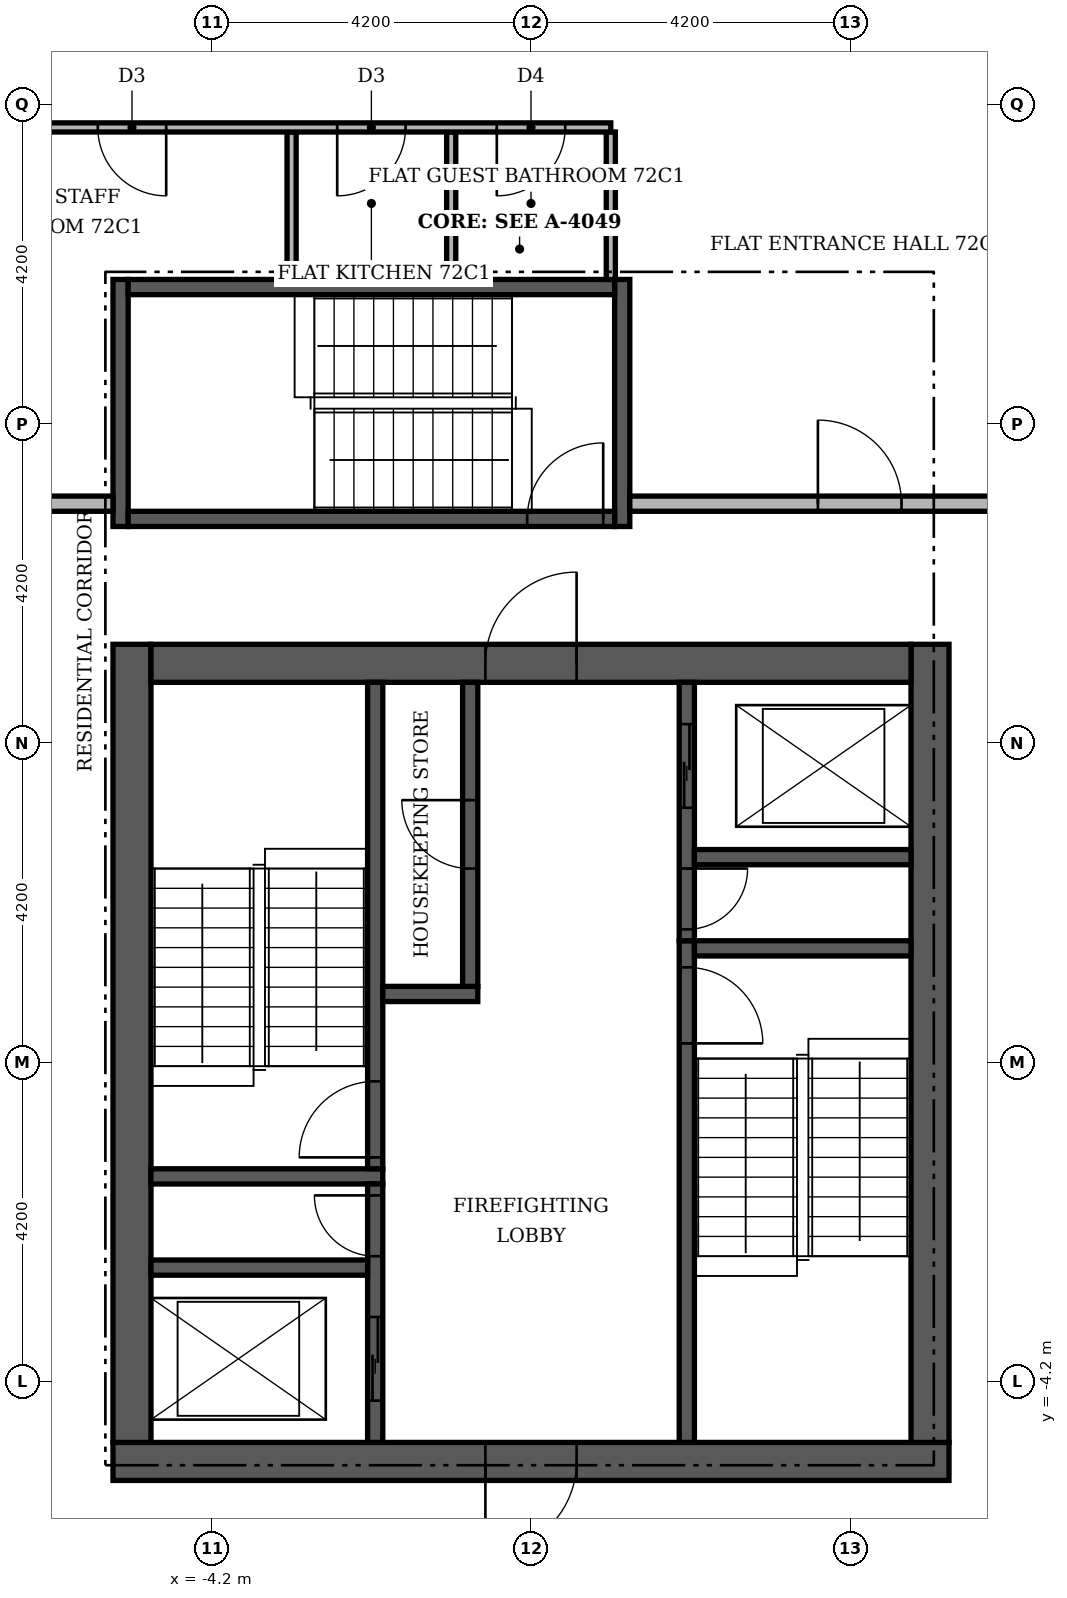
"""IFC4 building model, lengths in metres.
Left out: names, types, materials, properties, quantities, classifications, styles, units other than length and angle.
Written with IfcOpenShell. Run it as: python <this file> out.ifc"""

import sys

from ifc_helpers import new_model, si_unit, direction, frame, frame_2d, origin, place, context, subcontext, project, spatial, rectangle, extrude, element, fill, save


model = new_model("IFC4")
c1 = context("Model", 3, precision=1e-05, world=origin(), true_north=direction((0.0, 1.0)))
c2 = subcontext(c1, "Body", "Model", "MODEL_VIEW")
j1 = project(units=[si_unit("LENGTHUNIT", "METRE"), si_unit("PLANEANGLEUNIT", "RADIAN")], contexts=[c1])
p1 = place(None, origin())
s1 = spatial("IfcSite", under=j1, at=p1, CompositionType="ELEMENT")
p2 = place(p1, origin())
s2 = spatial("IfcBuilding", under=s1, at=p2, CompositionType="ELEMENT")
p3 = place(p2, frame((0.0, 0.0, 300.6)))
s3 = spatial("IfcBuildingStorey", under=s2, at=p3, CompositionType="ELEMENT", Elevation=300.6)
p4 = place(p3, frame((-5.5, -5.25, 0.0), z_axis=(0.0, 0.0, 1.0), x_axis=(1.0, 0.0, 0.0)))
e1 = element("IfcWall", 1, at=p4, inside=s3, PredefinedType="SHEAR", context=c2, shape_type="SweptSolid", body=[
    extrude(rectangle(XDim=11.0, YDim=0.5, at=frame_2d((5.5, 0.0))), origin(), (0.0, 0.0, 1.0), 3.55),
])
p5 = place(p4, frame((4.9, 0.0, 0.0)))
e2 = element("IfcOpeningElement", 2, at=p5, cuts=e1, PredefinedType="OPENING", context=c2, shape_type="SweptSolid", body=[
    extrude(rectangle(XDim=1.2, YDim=2.1, at=frame_2d((0.6, 1.05))), frame((0.0, 0.26, 0.0), z_axis=(0.0, -1.0, 0.0), x_axis=(1.0, 0.0, 0.0)), (0.0, 0.0, 1.0), 0.52),
])
for number, where, z_axis, x_axis in (
    (3, (-5.25, -5.0, 0.0), (0.0, 0.0, 1.0), (0.0, 1.0, 0.0)),
    (4, (5.25, -5.0, 0.0), (0.0, 0.0, 1.0), (0.0, 1.0, 0.0)),
):
    element("IfcWall", number, at=place(p3, frame(where, z_axis=z_axis, x_axis=x_axis)), inside=s3, PredefinedType="SHEAR", context=c2, shape_type="SweptSolid", body=[
        extrude(rectangle(XDim=10.5, YDim=0.5, at=frame_2d((5.25, 0.0))), origin(), (0.0, 0.0, 1.0), 3.55),
    ])
p6 = place(p3, frame((-5.0, 5.25, 0.0), z_axis=(0.0, 0.0, 1.0), x_axis=(1.0, 0.0, 0.0)))
e5 = element("IfcWall", 5, at=p6, inside=s3, PredefinedType="SHEAR", context=c2, shape_type="SweptSolid", body=[
    extrude(rectangle(XDim=10.0, YDim=0.5, at=frame_2d((5.0, 0.0))), origin(), (0.0, 0.0, 1.0), 3.55),
])
p7 = place(p6, frame((4.4, 0.0, 0.0)))
e6 = element("IfcOpeningElement", 6, at=p7, cuts=e5, PredefinedType="OPENING", context=c2, shape_type="SweptSolid", body=[
    extrude(rectangle(XDim=1.2, YDim=2.1, at=frame_2d((0.6, 1.05))), frame((0.0, 0.26, 0.0), z_axis=(0.0, -1.0, 0.0), x_axis=(1.0, 0.0, 0.0)), (0.0, 0.0, 1.0), 0.52),
])
p8 = place(p3, frame((2.05, -5.0, 0.0), z_axis=(0.0, 0.0, 1.0), x_axis=(0.0, 1.0, 0.0)))
e7 = element("IfcWall", 7, at=p8, inside=s3, PredefinedType="SHEAR", context=c2, shape_type="SweptSolid", body=[
    extrude(rectangle(XDim=6.6, YDim=0.2, at=frame_2d((3.3, 0.0))), origin(), (0.0, 0.0, 1.0), 3.55),
])
p9 = place(p8, frame((5.25, 0.0, 0.0)))
e8 = element("IfcOpeningElement", 8, at=p9, cuts=e7, PredefinedType="OPENING", context=c2, shape_type="SweptSolid", body=[
    extrude(rectangle(XDim=1.0, YDim=2.1, at=frame_2d((0.5, 1.05))), frame((0.0, 0.11, 0.0), z_axis=(0.0, -1.0, 0.0), x_axis=(1.0, 0.0, 0.0)), (0.0, 0.0, 1.0), 0.22),
])
p10 = place(p3, frame((-5.0, -1.5, 0.0), z_axis=(0.0, 0.0, 1.0), x_axis=(1.0, 0.0, 0.0)))
e9 = element("IfcWall", 9, at=p10, inside=s3, PredefinedType="SHEAR", context=c2, shape_type="SweptSolid", body=[
    extrude(rectangle(XDim=3.05, YDim=0.2, at=frame_2d((1.525, 0.0))), origin(), (0.0, 0.0, 1.0), 3.55),
])
p11 = place(p3, frame((-2.05, -1.4, 0.0), z_axis=(0.0, 0.0, 1.0), x_axis=(0.0, 1.0, 0.0)))
e10 = element("IfcWall", 10, at=p11, inside=s3, PredefinedType="SHEAR", context=c2, shape_type="SweptSolid", body=[
    extrude(rectangle(XDim=6.4, YDim=0.2, at=frame_2d((3.2, 0.0))), origin(), (0.0, 0.0, 1.0), 3.55),
])
p12 = place(p11, frame((0.15, 0.0, 0.0)))
e11 = element("IfcOpeningElement", 11, at=p12, cuts=e10, PredefinedType="OPENING", context=c2, shape_type="SweptSolid", body=[
    extrude(rectangle(XDim=1.0, YDim=2.1, at=frame_2d((0.5, 1.05))), frame((0.0, 0.11, 0.0), z_axis=(0.0, -1.0, 0.0), x_axis=(1.0, 0.0, 0.0)), (0.0, 0.0, 1.0), 0.22),
])
p13 = place(p3, frame((2.15, 1.5, 0.0), z_axis=(0.0, 0.0, 1.0), x_axis=(1.0, 0.0, 0.0)))
e12 = element("IfcWall", 12, at=p13, inside=s3, PredefinedType="SHEAR", context=c2, shape_type="SweptSolid", body=[
    extrude(rectangle(XDim=2.85, YDim=0.2, at=frame_2d((1.425, 0.0))), origin(), (0.0, 0.0, 1.0), 3.55),
])
p14 = place(p3, frame((-2.05, -5.0, 0.0), z_axis=(0.0, 0.0, 1.0), x_axis=(0.0, 1.0, 0.0)))
e13 = element("IfcWall", 13, at=p14, inside=s3, PredefinedType="SHEAR", context=c2, shape_type="SweptSolid", body=[
    extrude(rectangle(XDim=3.4, YDim=0.2, at=frame_2d((1.7, 0.0))), origin(), (0.0, 0.0, 1.0), 3.55),
])
p15 = place(p14, frame((0.55, 0.0, 0.0)))
e14 = element("IfcOpeningElement", 14, at=p15, cuts=e13, PredefinedType="OPENING", context=c2, shape_type="SweptSolid", body=[
    extrude(rectangle(XDim=1.1, YDim=2.1, at=frame_2d((0.55, 1.05))), frame((0.0, 0.11, 0.0), z_axis=(0.0, -1.0, 0.0), x_axis=(1.0, 0.0, 0.0)), (0.0, 0.0, 1.0), 0.22),
])
p16 = place(p14, frame((2.45, 0.0, 0.0)))
e15 = element("IfcOpeningElement", 15, at=p16, cuts=e13, PredefinedType="OPENING", context=c2, shape_type="SweptSolid", body=[
    extrude(rectangle(XDim=0.8, YDim=2.1, at=frame_2d((0.4, 1.05))), frame((0.0, 0.11, 0.0), z_axis=(0.0, -1.0, 0.0), x_axis=(1.0, 0.0, 0.0)), (0.0, 0.0, 1.0), 0.22),
])
p17 = place(p3, frame((-5.0, -2.7, 0.0), z_axis=(0.0, 0.0, 1.0), x_axis=(1.0, 0.0, 0.0)))
e16 = element("IfcWall", 16, at=p17, inside=s3, PredefinedType="SHEAR", context=c2, shape_type="SweptSolid", body=[
    extrude(rectangle(XDim=2.85, YDim=0.2, at=frame_2d((1.425, 0.0))), origin(), (0.0, 0.0, 1.0), 3.55),
])
p18 = place(p3, frame((-1.95, 0.9, 0.0), z_axis=(0.0, 0.0, 1.0), x_axis=(1.0, 0.0, 0.0)))
e17 = element("IfcWall", 17, at=p18, inside=s3, PredefinedType="SHEAR", context=c2, shape_type="SweptSolid", body=[
    extrude(rectangle(XDim=1.25, YDim=0.2, at=frame_2d((0.625, 0.0))), origin(), (0.0, 0.0, 1.0), 3.55),
])
p19 = place(p3, frame((-0.8, 1.0, 0.0), z_axis=(0.0, 0.0, 1.0), x_axis=(0.0, 1.0, 0.0)))
e18 = element("IfcWall", 18, at=p19, inside=s3, PredefinedType="SHEAR", context=c2, shape_type="SweptSolid", body=[
    extrude(rectangle(XDim=4.0, YDim=0.2, at=frame_2d((2.0, 0.0))), origin(), (0.0, 0.0, 1.0), 3.55),
])
p20 = place(p19, frame((1.55, 0.0, 0.0)))
e19 = element("IfcOpeningElement", 19, at=p20, cuts=e18, PredefinedType="OPENING", context=c2, shape_type="SweptSolid", body=[
    extrude(rectangle(XDim=0.9, YDim=2.1, at=frame_2d((0.45, 1.05))), frame((0.0, 0.11, 0.0), z_axis=(0.0, -1.0, 0.0), x_axis=(1.0, 0.0, 0.0)), (0.0, 0.0, 1.0), 0.22),
])
p21 = place(p3, frame((2.05, 1.6, 0.0), z_axis=(0.0, 0.0, 1.0), x_axis=(0.0, 1.0, 0.0)))
e20 = element("IfcWall", 20, at=p21, inside=s3, PredefinedType="SHEAR", context=c2, shape_type="SweptSolid", body=[
    extrude(rectangle(XDim=3.4, YDim=0.2, at=frame_2d((1.7, 0.0))), origin(), (0.0, 0.0, 1.0), 3.55),
])
p22 = place(p21, frame((1.75, 0.0, 0.0)))
e21 = element("IfcOpeningElement", 21, at=p22, cuts=e20, PredefinedType="OPENING", context=c2, shape_type="SweptSolid", body=[
    extrude(rectangle(XDim=1.1, YDim=2.1, at=frame_2d((0.55, 1.05))), frame((0.0, 0.11, 0.0), z_axis=(0.0, -1.0, 0.0), x_axis=(1.0, 0.0, 0.0)), (0.0, 0.0, 1.0), 0.22),
])
p23 = place(p21, frame((0.15, 0.0, 0.0)))
e22 = element("IfcOpeningElement", 22, at=p23, cuts=e20, PredefinedType="OPENING", context=c2, shape_type="SweptSolid", body=[
    extrude(rectangle(XDim=0.8, YDim=2.1, at=frame_2d((0.4, 1.05))), frame((0.0, 0.11, 0.0), z_axis=(0.0, -1.0, 0.0), x_axis=(1.0, 0.0, 0.0)), (0.0, 0.0, 1.0), 0.22),
])
p24 = place(p3, frame((2.15, 2.7, 0.0), z_axis=(0.0, 0.0, 1.0), x_axis=(1.0, 0.0, 0.0)))
e23 = element("IfcWall", 23, at=p24, inside=s3, PredefinedType="SHEAR", context=c2, shape_type="SweptSolid", body=[
    extrude(rectangle(XDim=2.85, YDim=0.2, at=frame_2d((1.425, 0.0))), origin(), (0.0, 0.0, 1.0), 3.55),
])
for number, where, z_axis, x_axis in (
    (24, (-5.4, 7.05, 0.0), (0.0, 0.0, 1.0), (0.0, 1.0, 0.0)),
    (25, (1.2, 7.05, 0.0), (0.0, 0.0, 1.0), (0.0, 1.0, 0.0)),
):
    element("IfcWall", number, at=place(p3, frame(where, z_axis=z_axis, x_axis=x_axis)), inside=s3, PredefinedType="SHEAR", context=c2, shape_type="SweptSolid", body=[
        extrude(rectangle(XDim=3.25, YDim=0.2, at=frame_2d((1.625, 0.0))), origin(), (0.0, 0.0, 1.0), 3.55),
    ])
p25 = place(p3, frame((-5.3, 7.15, 0.0), z_axis=(0.0, 0.0, 1.0), x_axis=(1.0, 0.0, 0.0)))
e26 = element("IfcWall", 26, at=p25, inside=s3, PredefinedType="SHEAR", context=c2, shape_type="SweptSolid", body=[
    extrude(rectangle(XDim=6.4, YDim=0.2, at=frame_2d((3.2, 0.0))), origin(), (0.0, 0.0, 1.0), 3.55),
])
p26 = place(p25, frame((5.25, 0.0, 0.0)))
e27 = element("IfcOpeningElement", 27, at=p26, cuts=e26, PredefinedType="OPENING", context=c2, shape_type="SweptSolid", body=[
    extrude(rectangle(XDim=1.0, YDim=2.1, at=frame_2d((0.5, 1.05))), frame((0.0, 0.11, 0.0), z_axis=(0.0, -1.0, 0.0), x_axis=(1.0, 0.0, 0.0)), (0.0, 0.0, 1.0), 0.22),
])
p27 = place(p3, frame((-5.3, 10.2, 0.0), z_axis=(0.0, 0.0, 1.0), x_axis=(1.0, 0.0, 0.0)))
e28 = element("IfcWall", 28, at=p27, inside=s3, PredefinedType="SHEAR", context=c2, shape_type="SweptSolid", body=[
    extrude(rectangle(XDim=6.4, YDim=0.2, at=frame_2d((3.2, 0.0))), origin(), (0.0, 0.0, 1.0), 3.55),
])
p28 = place(p3, frame((-7.35, 7.35, 0.0), z_axis=(0.0, 0.0, 1.0), x_axis=(1.0, 0.0, 0.0)))
e29 = element("IfcWall", 29, at=p28, inside=s3, PredefinedType="PARTITIONING", context=c2, shape_type="SweptSolid", body=[
    extrude(rectangle(XDim=1.85, YDim=0.2, at=frame_2d((0.925, 0.0))), origin(), (0.0, 0.0, 1.0), 3.55),
])
p29 = place(p3, frame((1.3, 7.35, 0.0), z_axis=(0.0, 0.0, 1.0), x_axis=(1.0, 0.0, 0.0)))
e30 = element("IfcWall", 30, at=p29, inside=s3, PredefinedType="PARTITIONING", context=c2, shape_type="SweptSolid", body=[
    extrude(rectangle(XDim=17.2, YDim=0.2, at=frame_2d((8.6, 0.0))), origin(), (0.0, 0.0, 1.0), 3.55),
])
p30 = place(p29, frame((2.475, 0.0, 0.0)))
e31 = element("IfcOpeningElement", 31, at=p30, cuts=e30, PredefinedType="OPENING", context=c2, shape_type="SweptSolid", body=[
    extrude(rectangle(XDim=1.1, YDim=2.4, at=frame_2d((0.55, 1.2))), frame((0.0, 0.11, 0.0), z_axis=(0.0, -1.0, 0.0), x_axis=(1.0, 0.0, 0.0)), (0.0, 0.0, 1.0), 0.22),
])
for number, where, z_axis, x_axis in (
    (32, (-3.15, 10.3, 0.0), (0.0, 0.0, 1.0), (0.0, 1.0, 0.0)),
    (33, (-1.05, 10.3, 0.0), (0.0, 0.0, 1.0), (0.0, 1.0, 0.0)),
    (34, (1.05, 10.3, 0.0), (0.0, 0.0, 1.0), (0.0, 1.0, 0.0)),
):
    element("IfcWall", number, at=place(p3, frame(where, z_axis=z_axis, x_axis=x_axis)), inside=s3, PredefinedType="PARTITIONING", context=c2, shape_type="SweptSolid", body=[
        extrude(rectangle(XDim=1.94, YDim=0.12, at=frame_2d((0.97, 0.0))), origin(), (0.0, 0.0, 1.0), 3.55),
    ])
p31 = place(p3, frame((-7.25, 12.3, 0.0), z_axis=(0.0, 0.0, 1.0), x_axis=(1.0, 0.0, 0.0)))
e35 = element("IfcWall", 35, at=p31, inside=s3, PredefinedType="PARTITIONING", context=c2, shape_type="SweptSolid", body=[
    extrude(rectangle(XDim=8.3, YDim=0.12, at=frame_2d((4.15, 0.0))), origin(), (0.0, 0.0, 1.0), 3.55),
])
p32 = place(p31, frame((6.8, 0.0, 0.0)))
e36 = element("IfcOpeningElement", 36, at=p32, cuts=e35, PredefinedType="OPENING", context=c2, shape_type="SweptSolid", body=[
    extrude(rectangle(XDim=0.9, YDim=2.1, at=frame_2d((0.45, 1.05))), frame((0.0, 0.07, 0.0), z_axis=(0.0, -1.0, 0.0), x_axis=(1.0, 0.0, 0.0)), (0.0, 0.0, 1.0), 0.14),
])
p33 = place(p31, frame((4.7, 0.0, 0.0)))
e37 = element("IfcOpeningElement", 37, at=p33, cuts=e35, PredefinedType="OPENING", context=c2, shape_type="SweptSolid", body=[
    extrude(rectangle(XDim=0.9, YDim=2.1, at=frame_2d((0.45, 1.05))), frame((0.0, 0.07, 0.0), z_axis=(0.0, -1.0, 0.0), x_axis=(1.0, 0.0, 0.0)), (0.0, 0.0, 1.0), 0.14),
])
p34 = place(p31, frame((1.55, 0.0, 0.0)))
e38 = element("IfcOpeningElement", 38, at=p34, cuts=e35, PredefinedType="OPENING", context=c2, shape_type="SweptSolid", body=[
    extrude(rectangle(XDim=0.9, YDim=2.1, at=frame_2d((0.45, 1.05))), frame((0.0, 0.07, 0.0), z_axis=(0.0, -1.0, 0.0), x_axis=(1.0, 0.0, 0.0)), (0.0, 0.0, 1.0), 0.14),
])
p35 = place(p22, origin())
e39 = element("IfcDoor", 39, at=p35, inside=s3, OperationType="SLIDING_TO_LEFT", PredefinedType="DOOR", context=c2, shape_type="SweptSolid", body=[
    extrude(rectangle(XDim=1.1, YDim=2.1, at=frame_2d((0.55, 1.05))), frame((0.0, 0.025, 0.0), z_axis=(0.0, -1.0, 0.0), x_axis=(1.0, 0.0, 0.0)), (0.0, 0.0, 1.0), 0.05),
])
fill(e21, e39)
p36 = place(p15, origin())
e40 = element("IfcDoor", 40, at=p36, inside=s3, OperationType="SLIDING_TO_LEFT", PredefinedType="DOOR", context=c2, shape_type="SweptSolid", body=[
    extrude(rectangle(XDim=1.1, YDim=2.1, at=frame_2d((0.55, 1.05))), frame((0.0, 0.025, 0.0), z_axis=(0.0, -1.0, 0.0), x_axis=(1.0, 0.0, 0.0)), (0.0, 0.0, 1.0), 0.05),
])
fill(e14, e40)
p37 = place(p12, origin())
e41 = element("IfcDoor", 41, at=p37, inside=s3, OperationType="SINGLE_SWING_LEFT", PredefinedType="DOOR", context=c2, shape_type="SweptSolid", body=[
    extrude(rectangle(XDim=1.0, YDim=2.1, at=frame_2d((0.5, 1.05))), frame((0.0, 0.025, 0.0), z_axis=(0.0, -1.0, 0.0), x_axis=(1.0, 0.0, 0.0)), (0.0, 0.0, 1.0), 0.05),
])
fill(e11, e41)
p38 = place(p9, frame((1.0, 0.0, 0.0), z_axis=(0.0, 0.0, 1.0), x_axis=(-1.0, 0.0, 0.0)))
e42 = element("IfcDoor", 42, at=p38, inside=s3, OperationType="SINGLE_SWING_LEFT", PredefinedType="DOOR", context=c2, shape_type="SweptSolid", body=[
    extrude(rectangle(XDim=1.0, YDim=2.1, at=frame_2d((0.5, 1.05))), frame((0.0, 0.025, 0.0), z_axis=(0.0, -1.0, 0.0), x_axis=(1.0, 0.0, 0.0)), (0.0, 0.0, 1.0), 0.05),
])
fill(e8, e42)
p39 = place(p23, frame((0.8, 0.0, 0.0), z_axis=(0.0, 0.0, 1.0), x_axis=(-1.0, 0.0, 0.0)))
e43 = element("IfcDoor", 43, at=p39, inside=s3, OperationType="SINGLE_SWING_RIGHT", PredefinedType="DOOR", context=c2, shape_type="SweptSolid", body=[
    extrude(rectangle(XDim=0.8, YDim=2.1, at=frame_2d((0.4, 1.05))), frame((0.0, 0.025, 0.0), z_axis=(0.0, -1.0, 0.0), x_axis=(1.0, 0.0, 0.0)), (0.0, 0.0, 1.0), 0.05),
])
fill(e22, e43)
p40 = place(p16, origin())
e44 = element("IfcDoor", 44, at=p40, inside=s3, OperationType="SINGLE_SWING_RIGHT", PredefinedType="DOOR", context=c2, shape_type="SweptSolid", body=[
    extrude(rectangle(XDim=0.8, YDim=2.1, at=frame_2d((0.4, 1.05))), frame((0.0, 0.025, 0.0), z_axis=(0.0, -1.0, 0.0), x_axis=(1.0, 0.0, 0.0)), (0.0, 0.0, 1.0), 0.05),
])
fill(e15, e44)
p41 = place(p26, origin())
e45 = element("IfcDoor", 45, at=p41, inside=s3, OperationType="SINGLE_SWING_RIGHT", PredefinedType="DOOR", context=c2, shape_type="SweptSolid", body=[
    extrude(rectangle(XDim=1.0, YDim=2.1, at=frame_2d((0.5, 1.05))), frame((0.0, 0.025, 0.0), z_axis=(0.0, -1.0, 0.0), x_axis=(1.0, 0.0, 0.0)), (0.0, 0.0, 1.0), 0.05),
])
fill(e27, e45)
p42 = place(p20, origin())
e46 = element("IfcDoor", 46, at=p42, inside=s3, OperationType="SINGLE_SWING_RIGHT", PredefinedType="DOOR", context=c2, shape_type="SweptSolid", body=[
    extrude(rectangle(XDim=0.9, YDim=2.1, at=frame_2d((0.45, 1.05))), frame((0.0, 0.025, 0.0), z_axis=(0.0, -1.0, 0.0), x_axis=(1.0, 0.0, 0.0)), (0.0, 0.0, 1.0), 0.05),
])
fill(e19, e46)
p43 = place(p7, origin())
e47 = element("IfcDoor", 47, at=p43, inside=s3, OperationType="SINGLE_SWING_RIGHT", PredefinedType="DOOR", context=c2, shape_type="SweptSolid", body=[
    extrude(rectangle(XDim=1.2, YDim=2.1, at=frame_2d((0.6, 1.05))), frame((0.0, 0.025, 0.0), z_axis=(0.0, -1.0, 0.0), x_axis=(1.0, 0.0, 0.0)), (0.0, 0.0, 1.0), 0.05),
])
fill(e6, e47)
p44 = place(p5, frame((1.2, 0.0, 0.0), z_axis=(0.0, 0.0, 1.0), x_axis=(-1.0, 0.0, 0.0)))
e48 = element("IfcDoor", 48, at=p44, inside=s3, OperationType="SINGLE_SWING_LEFT", PredefinedType="DOOR", context=c2, shape_type="SweptSolid", body=[
    extrude(rectangle(XDim=1.2, YDim=2.1, at=frame_2d((0.6, 1.05))), frame((0.0, 0.025, 0.0), z_axis=(0.0, -1.0, 0.0), x_axis=(1.0, 0.0, 0.0)), (0.0, 0.0, 1.0), 0.05),
])
fill(e2, e48)
p45 = place(p30, origin())
e49 = element("IfcDoor", 49, at=p45, inside=s3, OperationType="SINGLE_SWING_LEFT", PredefinedType="DOOR", context=c2, shape_type="SweptSolid", body=[
    extrude(rectangle(XDim=1.1, YDim=2.4, at=frame_2d((0.55, 1.2))), frame((0.0, 0.025, 0.0), z_axis=(0.0, -1.0, 0.0), x_axis=(1.0, 0.0, 0.0)), (0.0, 0.0, 1.0), 0.05),
])
fill(e31, e49)
p46 = place(p32, frame((0.9, 0.0, 0.0), z_axis=(0.0, 0.0, 1.0), x_axis=(-1.0, 0.0, 0.0)))
e50 = element("IfcDoor", 50, at=p46, inside=s3, OperationType="SINGLE_SWING_LEFT", PredefinedType="DOOR", context=c2, shape_type="SweptSolid", body=[
    extrude(rectangle(XDim=0.9, YDim=2.1, at=frame_2d((0.45, 1.05))), frame((0.0, 0.025, 0.0), z_axis=(0.0, -1.0, 0.0), x_axis=(1.0, 0.0, 0.0)), (0.0, 0.0, 1.0), 0.05),
])
fill(e36, e50)
p47 = place(p33, frame((0.9, 0.0, 0.0), z_axis=(0.0, 0.0, 1.0), x_axis=(-1.0, 0.0, 0.0)))
e51 = element("IfcDoor", 51, at=p47, inside=s3, OperationType="SINGLE_SWING_LEFT", PredefinedType="DOOR", context=c2, shape_type="SweptSolid", body=[
    extrude(rectangle(XDim=0.9, YDim=2.1, at=frame_2d((0.45, 1.05))), frame((0.0, 0.025, 0.0), z_axis=(0.0, -1.0, 0.0), x_axis=(1.0, 0.0, 0.0)), (0.0, 0.0, 1.0), 0.05),
])
fill(e37, e51)
p48 = place(p34, frame((0.9, 0.0, 0.0), z_axis=(0.0, 0.0, 1.0), x_axis=(-1.0, 0.0, 0.0)))
e52 = element("IfcDoor", 52, at=p48, inside=s3, OperationType="SINGLE_SWING_RIGHT", PredefinedType="DOOR", context=c2, shape_type="SweptSolid", body=[
    extrude(rectangle(XDim=0.9, YDim=2.1, at=frame_2d((0.45, 1.05))), frame((0.0, 0.025, 0.0), z_axis=(0.0, -1.0, 0.0), x_axis=(1.0, 0.0, 0.0)), (0.0, 0.0, 1.0), 0.05),
])
fill(e38, e52)
save(model, sys.argv[1])
